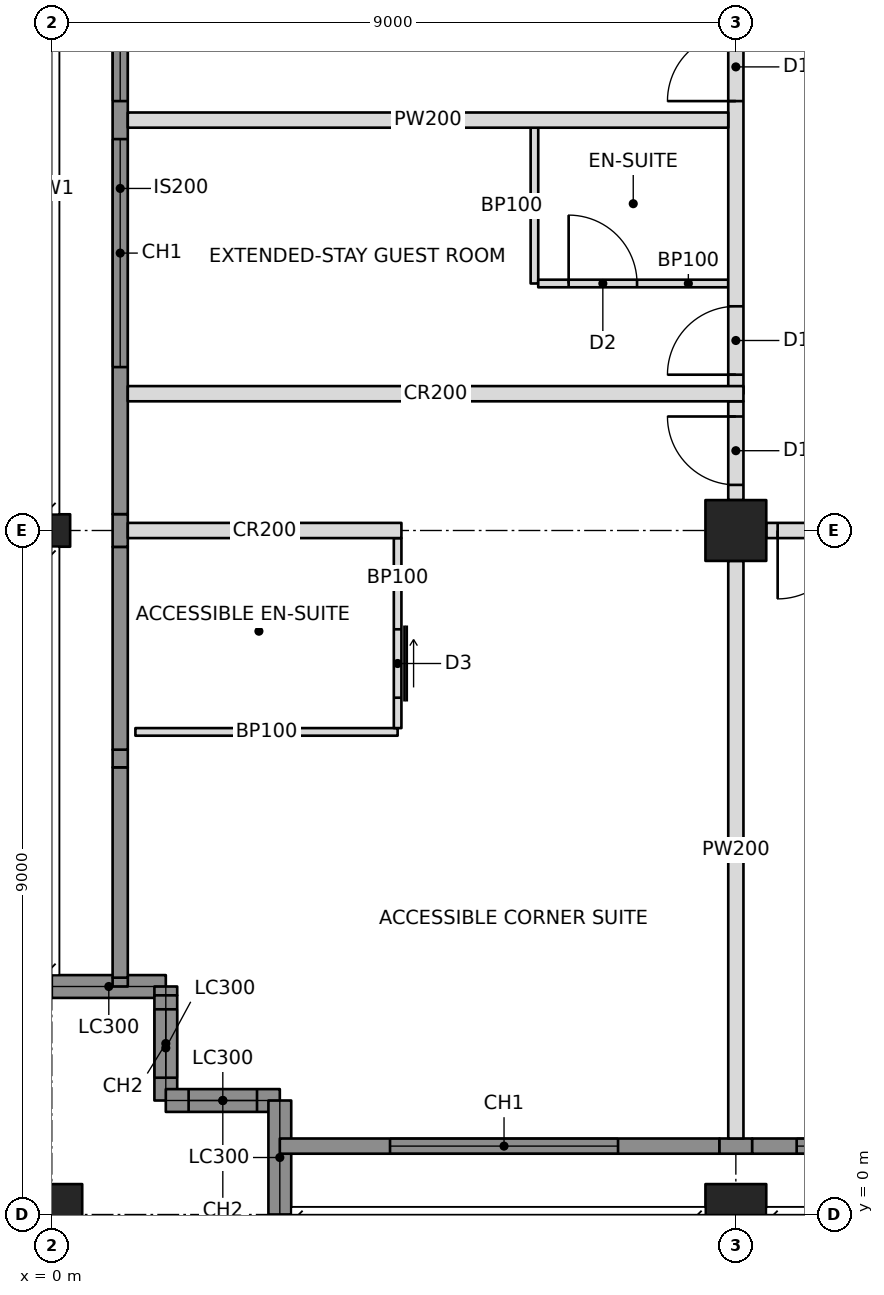
"""IFC4 building model, lengths in metres.
Left out: names, types, materials, properties, quantities, classifications, styles, units other than length and angle.
Written with IfcOpenShell. Run it as: python <this file> out.ifc"""

import sys

from ifc_helpers import new_model, si_unit, direction, frame, frame_2d, origin, origin_with_axes, origin_2d, place, context, subcontext, project, spatial, rectangle, hollow_rectangle, i_section, extrude, element, fill, save


model = new_model("IFC4")
c1 = context("Model", 3, precision=1e-05, world=origin(), true_north=direction((0.0, 1.0)))
c2 = subcontext(c1, "Body", "Model", "MODEL_VIEW")
j1 = project(units=[si_unit("LENGTHUNIT", "METRE"), si_unit("PLANEANGLEUNIT", "RADIAN")], contexts=[c1])
p1 = place(None, origin())
s1 = spatial("IfcSite", under=j1, at=p1, CompositionType="ELEMENT")
p2 = place(p1, origin())
s2 = spatial("IfcBuilding", under=s1, at=p2, CompositionType="ELEMENT")
p3 = place(p2, frame((0.0, 0.0, 218.2)))
s3 = spatial("IfcBuildingStorey", under=s2, at=p3, CompositionType="ELEMENT", Elevation=218.2)
p4 = place(p3, origin_with_axes())
e1 = element("IfcColumn", 1, at=p4, inside=s3, PredefinedType="COLUMN", context=c2, shape_type="SweptSolid", body=[
    extrude(hollow_rectangle(XDim=0.8, YDim=0.8, WallThickness=0.06, at=origin_2d()), origin(), (0.0, 0.0, 1.0), 3.4),
])
p5 = place(p3, frame((0.0, 9.0, 0.0), z_axis=(0.0, 0.0, 1.0), x_axis=(0.0, 1.0, 0.0)))
e2 = element("IfcColumn", 2, at=p5, inside=s3, PredefinedType="COLUMN", context=c2, shape_type="SweptSolid", body=[
    extrude(i_section(OverallWidth=0.427, OverallDepth=0.483, WebThickness=0.051, FlangeThickness=0.082, at=origin_2d()), origin(), (0.0, 0.0, 1.0), 3.4),
])
p6 = place(p3, frame((9.0, 0.0, 0.0), z_axis=(0.0, 0.0, 1.0), x_axis=(1.0, 0.0, 0.0)))
e3 = element("IfcColumn", 3, at=p6, inside=s3, PredefinedType="COLUMN", context=c2, shape_type="SweptSolid", body=[
    extrude(hollow_rectangle(XDim=0.8, YDim=0.8, WallThickness=0.06, at=origin_2d()), origin(), (0.0, 0.0, 1.0), 3.4),
])
p7 = place(p3, frame((9.0, 9.0, 0.0), z_axis=(0.0, 0.0, 1.0), x_axis=(1.0, 0.0, 0.0)))
e4 = element("IfcColumn", 4, at=p7, inside=s3, PredefinedType="COLUMN", context=c2, shape_type="SweptSolid", body=[
    extrude(hollow_rectangle(XDim=0.8, YDim=0.8, WallThickness=0.1, at=origin_2d()), origin(), (0.0, 0.0, 1.0), 3.4),
])
p8 = place(p3, frame((0.0, 3.0, 0.0), z_axis=(0.0, 0.0, 1.0), x_axis=(1.0, 0.0, 0.0)))
e5 = element("IfcWall", 5, at=p8, inside=s3, PredefinedType="SOLIDWALL", context=c2, shape_type="SweptSolid", body=[
    extrude(rectangle(XDim=1.5, YDim=0.3, at=frame_2d((0.75, 0.0))), origin(), (0.0, 0.0, 1.0), 2.202),
])
p9 = place(p3, frame((1.5, 3.0, 0.0), z_axis=(0.0, 0.0, 1.0), x_axis=(0.0, -1.0, 0.0)))
e6 = element("IfcWall", 6, at=p9, inside=s3, PredefinedType="SOLIDWALL", context=c2, shape_type="SweptSolid", body=[
    extrude(rectangle(XDim=0.116, YDim=0.3, at=frame_2d((0.058, 0.0))), origin(), (0.0, 0.0, 1.0), 2.542),
])
p10 = place(p3, frame((1.5, 1.5, 0.0), z_axis=(0.0, 0.0, 1.0), x_axis=(1.0, 0.0, 0.0)))
e7 = element("IfcWall", 7, at=p10, inside=s3, PredefinedType="SOLIDWALL", context=c2, shape_type="SweptSolid", body=[
    extrude(rectangle(XDim=1.5, YDim=0.3, at=frame_2d((0.75, 0.0))), origin(), (0.0, 0.0, 1.0), 3.15),
])
p11 = place(p10, frame((0.3, 0.0, 0.6)))
e8 = element("IfcOpeningElement", 8, at=p11, cuts=e7, PredefinedType="OPENING", context=c2, shape_type="SweptSolid", body=[
    extrude(rectangle(XDim=0.9, YDim=2.2, at=frame_2d((0.45, 1.1))), frame((0.0, 0.16, 0.0), z_axis=(0.0, -1.0, 0.0), x_axis=(1.0, 0.0, 0.0)), (0.0, 0.0, 1.0), 0.32),
])
p12 = place(p3, frame((3.0, 1.5, 0.0), z_axis=(0.0, 0.0, 1.0), x_axis=(0.0, -1.0, 0.0)))
e9 = element("IfcWall", 9, at=p12, inside=s3, PredefinedType="SOLIDWALL", context=c2, shape_type="SweptSolid", body=[
    extrude(rectangle(XDim=1.5, YDim=0.3, at=frame_2d((0.75, 0.0))), origin(), (0.0, 0.0, 1.0), 2.202),
])
p13 = place(p3, frame((3.0, 0.9, 0.0), z_axis=(0.0, 0.0, 1.0), x_axis=(1.0, 0.0, 0.0)))
e10 = element("IfcWall", 10, at=p13, inside=s3, PredefinedType="SOLIDWALL", context=c2, shape_type="SweptSolid", body=[
    extrude(rectangle(XDim=5.785, YDim=0.2, at=frame_2d((2.892, 0.0))), origin(), (0.0, 0.0, 1.0), 3.15),
])
p14 = place(p13, frame((1.45, 0.0, 0.6)))
e11 = element("IfcOpeningElement", 11, at=p14, cuts=e10, PredefinedType="OPENING", context=c2, shape_type="SweptSolid", body=[
    extrude(rectangle(XDim=3.0, YDim=2.2, at=frame_2d((1.5, 1.1))), frame((0.0, 0.11, 0.0), z_axis=(0.0, -1.0, 0.0), x_axis=(1.0, 0.0, 0.0)), (0.0, 0.0, 1.0), 0.22),
])
p15 = place(p3, frame((0.9, 3.0, 0.0), z_axis=(0.0, 0.0, 1.0), x_axis=(0.0, 1.0, 0.0)))
e12 = element("IfcWall", 12, at=p15, inside=s3, PredefinedType="SOLIDWALL", context=c2, shape_type="SweptSolid", body=[
    extrude(rectangle(XDim=0.116, YDim=0.2, at=frame_2d((0.058, 0.0))), origin(), (0.0, 0.0, 1.0), 2.542),
])
p16 = place(p3, frame((1.0, 9.0, 0.0), z_axis=(0.0, 0.0, 1.0), x_axis=(1.0, 0.0, 0.0)))
e13 = element("IfcWall", 13, at=p16, inside=s3, PredefinedType="PARTITIONING", context=c2, shape_type="SweptSolid", body=[
    extrude(rectangle(XDim=3.6, YDim=0.2, at=frame_2d((1.8, 0.0))), origin(), (0.0, 0.0, 1.0), 2.21),
])
p17 = place(p3, frame((9.4, 9.0, 0.0), z_axis=(0.0, 0.0, 1.0), x_axis=(1.0, 0.0, 0.0)))
e14 = element("IfcWall", 14, at=p17, inside=s3, PredefinedType="PARTITIONING", context=c2, shape_type="SweptSolid", body=[
    extrude(rectangle(XDim=8.2, YDim=0.2, at=frame_2d((4.1, 0.0))), origin(), (0.0, 0.0, 1.0), 2.21),
])
p18 = place(p17, frame((0.15, 0.0, 0.0)))
e15 = element("IfcOpeningElement", 15, at=p18, cuts=e14, PredefinedType="OPENING", context=c2, shape_type="SweptSolid", body=[
    extrude(rectangle(XDim=0.9, YDim=2.1, at=frame_2d((0.45, 1.05))), frame((0.0, 0.11, 0.0), z_axis=(0.0, -1.0, 0.0), x_axis=(1.0, 0.0, 0.0)), (0.0, 0.0, 1.0), 0.22),
])
p19 = place(p3, frame((9.0, 10.8, 0.0), z_axis=(0.0, 0.0, 1.0), x_axis=(0.0, 1.0, 0.0)))
e16 = element("IfcWall", 16, at=p19, inside=s3, PredefinedType="PARTITIONING", context=c2, shape_type="SweptSolid", body=[
    extrude(rectangle(XDim=6.8, YDim=0.2, at=frame_2d((3.4, 0.0))), origin(), (0.0, 0.0, 1.0), 2.21),
])
p20 = place(p19, frame((0.25, 0.0, 0.0)))
e17 = element("IfcOpeningElement", 17, at=p20, cuts=e16, PredefinedType="OPENING", context=c2, shape_type="SweptSolid", body=[
    extrude(rectangle(XDim=0.9, YDim=2.1, at=frame_2d((0.45, 1.05))), frame((0.0, 0.11, 0.0), z_axis=(0.0, -1.0, 0.0), x_axis=(1.0, 0.0, 0.0)), (0.0, 0.0, 1.0), 0.22),
])
p21 = place(p19, frame((3.85, 0.0, 0.0)))
e18 = element("IfcOpeningElement", 18, at=p21, cuts=e16, PredefinedType="OPENING", context=c2, shape_type="SweptSolid", body=[
    extrude(rectangle(XDim=0.9, YDim=2.1, at=frame_2d((0.45, 1.05))), frame((0.0, 0.11, 0.0), z_axis=(0.0, -1.0, 0.0), x_axis=(1.0, 0.0, 0.0)), (0.0, 0.0, 1.0), 0.22),
])
p22 = place(p3, frame((1.0, 10.8, 0.0), z_axis=(0.0, 0.0, 1.0), x_axis=(1.0, 0.0, 0.0)))
e19 = element("IfcWall", 19, at=p22, inside=s3, PredefinedType="PARTITIONING", context=c2, shape_type="SweptSolid", body=[
    extrude(rectangle(XDim=8.1, YDim=0.2, at=frame_2d((4.05, 0.0))), origin(), (0.0, 0.0, 1.0), 2.21),
])
p23 = place(p3, frame((9.0, 8.6, 0.0), z_axis=(0.0, 0.0, 1.0), x_axis=(0.0, -1.0, 0.0)))
e20 = element("IfcWall", 20, at=p23, inside=s3, PredefinedType="PARTITIONING", context=c2, shape_type="SweptSolid", body=[
    extrude(rectangle(XDim=7.6, YDim=0.2, at=frame_2d((3.8, 0.0))), origin(), (0.0, 0.0, 1.0), 2.21),
])
p24 = place(p3, frame((1.1, 6.35, 0.0), z_axis=(0.0, 0.0, 1.0), x_axis=(1.0, 0.0, 0.0)))
e21 = element("IfcWall", 21, at=p24, inside=s3, PredefinedType="PARTITIONING", context=c2, shape_type="SweptSolid", body=[
    extrude(rectangle(XDim=3.45, YDim=0.1, at=frame_2d((1.725, 0.0))), origin(), (0.0, 0.0, 1.0), 3.15),
])
p25 = place(p3, frame((4.55, 8.9, 0.0), z_axis=(0.0, 0.0, 1.0), x_axis=(0.0, -1.0, 0.0)))
e22 = element("IfcWall", 22, at=p25, inside=s3, PredefinedType="PARTITIONING", context=c2, shape_type="SweptSolid", body=[
    extrude(rectangle(XDim=2.5, YDim=0.1, at=frame_2d((1.25, 0.0))), origin(), (0.0, 0.0, 1.0), 2.21),
])
p26 = place(p25, frame((1.2, 0.0, 0.0)))
e23 = element("IfcOpeningElement", 23, at=p26, cuts=e22, PredefinedType="OPENING", context=c2, shape_type="SweptSolid", body=[
    extrude(rectangle(XDim=0.9, YDim=2.1, at=frame_2d((0.45, 1.05))), frame((0.0, 0.06, 0.0), z_axis=(0.0, -1.0, 0.0), x_axis=(1.0, 0.0, 0.0)), (0.0, 0.0, 1.0), 0.12),
])
p27 = place(p3, frame((8.9, 14.4, 0.0), z_axis=(0.0, 0.0, 1.0), x_axis=(-1.0, 0.0, 0.0)))
e24 = element("IfcWall", 24, at=p27, inside=s3, PredefinedType="PARTITIONING", context=c2, shape_type="SweptSolid", body=[
    extrude(rectangle(XDim=7.9, YDim=0.2, at=frame_2d((3.95, 0.0))), origin(), (0.0, 0.0, 1.0), 2.21),
])
p28 = place(p3, frame((6.35, 12.25, 0.0), z_axis=(0.0, 0.0, 1.0), x_axis=(0.0, 1.0, 0.0)))
e25 = element("IfcWall", 25, at=p28, inside=s3, PredefinedType="PARTITIONING", context=c2, shape_type="SweptSolid", body=[
    extrude(rectangle(XDim=2.05, YDim=0.1, at=frame_2d((1.025, 0.0))), origin(), (0.0, 0.0, 1.0), 3.15),
])
p29 = place(p3, frame((8.9, 12.25, 0.0), z_axis=(0.0, 0.0, 1.0), x_axis=(-1.0, 0.0, 0.0)))
e26 = element("IfcWall", 26, at=p29, inside=s3, PredefinedType="PARTITIONING", context=c2, shape_type="SweptSolid", body=[
    extrude(rectangle(XDim=2.5, YDim=0.1, at=frame_2d((1.25, 0.0))), origin(), (0.0, 0.0, 1.0), 2.21),
])
p30 = place(p29, frame((1.2, 0.0, 0.0)))
e27 = element("IfcOpeningElement", 27, at=p30, cuts=e26, PredefinedType="OPENING", context=c2, shape_type="SweptSolid", body=[
    extrude(rectangle(XDim=0.9, YDim=2.1, at=frame_2d((0.45, 1.05))), frame((0.0, 0.06, 0.0), z_axis=(0.0, -1.0, 0.0), x_axis=(1.0, 0.0, 0.0)), (0.0, 0.0, 1.0), 0.12),
])
p31 = place(p3, frame((9.0, 9.4, 0.0), z_axis=(0.0, 0.0, 1.0), x_axis=(0.0, 1.0, 0.0)))
e28 = element("IfcWall", 28, at=p31, inside=s3, PredefinedType="PARTITIONING", context=c2, shape_type="SweptSolid", body=[
    extrude(rectangle(XDim=1.3, YDim=0.2, at=frame_2d((0.65, 0.0))), origin(), (0.0, 0.0, 1.0), 2.21),
])
p32 = place(p31, frame((0.2, 0.0, 0.0)))
e29 = element("IfcOpeningElement", 29, at=p32, cuts=e28, PredefinedType="OPENING", context=c2, shape_type="SweptSolid", body=[
    extrude(rectangle(XDim=0.9, YDim=2.1, at=frame_2d((0.45, 1.05))), frame((0.0, 0.11, 0.0), z_axis=(0.0, -1.0, 0.0), x_axis=(1.0, 0.0, 0.0)), (0.0, 0.0, 1.0), 0.22),
])
p33 = place(p3, frame((1.5, 2.884, 0.0), z_axis=(0.0, 0.0, 1.0), x_axis=(0.0, -1.0, 0.0)))
e30 = element("IfcWall", 30, at=p33, inside=s3, PredefinedType="SOLIDWALL", context=c2, shape_type="SweptSolid", body=[
    extrude(rectangle(XDim=1.384, YDim=0.3, at=frame_2d((0.692, 0.0))), origin(), (0.0, 0.0, 1.0), 3.15),
])
p34 = place(p33, frame((0.184, 0.0, 0.6)))
e31 = element("IfcOpeningElement", 31, at=p34, cuts=e30, PredefinedType="OPENING", context=c2, shape_type="SweptSolid", body=[
    extrude(rectangle(XDim=0.9, YDim=2.2, at=frame_2d((0.45, 1.1))), frame((0.0, 0.16, 0.0), z_axis=(0.0, -1.0, 0.0), x_axis=(1.0, 0.0, 0.0)), (0.0, 0.0, 1.0), 0.32),
])
p35 = place(p3, frame((8.785, 0.9, 0.0), z_axis=(0.0, 0.0, 1.0), x_axis=(1.0, 0.0, 0.0)))
e32 = element("IfcWall", 32, at=p35, inside=s3, PredefinedType="SOLIDWALL", context=c2, shape_type="SweptSolid", body=[
    extrude(rectangle(XDim=0.431, YDim=0.2, at=frame_2d((0.215, 0.0))), origin(), (0.0, 0.0, 1.0), 2.21),
])
p36 = place(p3, frame((9.215, 0.9, 0.0), z_axis=(0.0, 0.0, 1.0), x_axis=(1.0, 0.0, 0.0)))
e33 = element("IfcWall", 33, at=p36, inside=s3, PredefinedType="SOLIDWALL", context=c2, shape_type="SweptSolid", body=[
    extrude(rectangle(XDim=8.571, YDim=0.2, at=frame_2d((4.285, 0.0))), origin(), (0.0, 0.0, 1.0), 3.15),
])
p37 = place(p36, frame((0.585, 0.0, 0.6)))
e34 = element("IfcOpeningElement", 34, at=p37, cuts=e33, PredefinedType="OPENING", context=c2, shape_type="SweptSolid", body=[
    extrude(rectangle(XDim=3.0, YDim=2.2, at=frame_2d((1.5, 1.1))), frame((0.0, 0.11, 0.0), z_axis=(0.0, -1.0, 0.0), x_axis=(1.0, 0.0, 0.0)), (0.0, 0.0, 1.0), 0.22),
])
p38 = place(p36, frame((4.985, 0.0, 0.6)))
e35 = element("IfcOpeningElement", 35, at=p38, cuts=e33, PredefinedType="OPENING", context=c2, shape_type="SweptSolid", body=[
    extrude(rectangle(XDim=3.0, YDim=2.2, at=frame_2d((1.5, 1.1))), frame((0.0, 0.11, 0.0), z_axis=(0.0, -1.0, 0.0), x_axis=(1.0, 0.0, 0.0)), (0.0, 0.0, 1.0), 0.22),
])
p39 = place(p3, frame((0.9, 3.116, 0.0), z_axis=(0.0, 0.0, 1.0), x_axis=(0.0, 1.0, 0.0)))
e36 = element("IfcWall", 36, at=p39, inside=s3, PredefinedType="SOLIDWALL", context=c2, shape_type="SweptSolid", body=[
    extrude(rectangle(XDim=2.768, YDim=0.2, at=frame_2d((1.384, 0.0))), origin(), (0.0, 0.0, 1.0), 3.15),
])
p40 = place(p3, frame((0.9, 5.884, 0.0), z_axis=(0.0, 0.0, 1.0), x_axis=(0.0, 1.0, 0.0)))
e37 = element("IfcWall", 37, at=p40, inside=s3, PredefinedType="SOLIDWALL", context=c2, shape_type="SweptSolid", body=[
    extrude(rectangle(XDim=0.232, YDim=0.2, at=frame_2d((0.116, 0.0))), origin(), (0.0, 0.0, 1.0), 2.542),
])
p41 = place(p3, frame((0.9, 6.116, 0.0), z_axis=(0.0, 0.0, 1.0), x_axis=(0.0, 1.0, 0.0)))
e38 = element("IfcWall", 38, at=p41, inside=s3, PredefinedType="SOLIDWALL", context=c2, shape_type="SweptSolid", body=[
    extrude(rectangle(XDim=2.668, YDim=0.2, at=frame_2d((1.334, 0.0))), origin(), (0.0, 0.0, 1.0), 3.15),
])
p42 = place(p3, frame((0.9, 8.785, 0.0), z_axis=(0.0, 0.0, 1.0), x_axis=(0.0, 1.0, 0.0)))
e39 = element("IfcWall", 39, at=p42, inside=s3, PredefinedType="SOLIDWALL", context=c2, shape_type="SweptSolid", body=[
    extrude(rectangle(XDim=0.431, YDim=0.2, at=frame_2d((0.215, 0.0))), origin(), (0.0, 0.0, 1.0), 2.21),
])
p43 = place(p3, frame((0.9, 9.215, 0.0), z_axis=(0.0, 0.0, 1.0), x_axis=(0.0, 1.0, 0.0)))
e40 = element("IfcWall", 40, at=p43, inside=s3, PredefinedType="SOLIDWALL", context=c2, shape_type="SweptSolid", body=[
    extrude(rectangle(XDim=8.571, YDim=0.2, at=frame_2d((4.285, 0.0))), origin(), (0.0, 0.0, 1.0), 3.15),
])
p44 = place(p43, frame((1.935, 0.0, 0.6)))
e41 = element("IfcOpeningElement", 41, at=p44, cuts=e40, PredefinedType="OPENING", context=c2, shape_type="SweptSolid", body=[
    extrude(rectangle(XDim=3.0, YDim=2.2, at=frame_2d((1.5, 1.1))), frame((0.0, 0.11, 0.0), z_axis=(0.0, -1.0, 0.0), x_axis=(1.0, 0.0, 0.0)), (0.0, 0.0, 1.0), 0.22),
])
p45 = place(p43, frame((5.435, 0.0, 0.6)))
e42 = element("IfcOpeningElement", 42, at=p45, cuts=e40, PredefinedType="OPENING", context=c2, shape_type="SweptSolid", body=[
    extrude(rectangle(XDim=3.0, YDim=2.2, at=frame_2d((1.5, 1.1))), frame((0.0, 0.11, 0.0), z_axis=(0.0, -1.0, 0.0), x_axis=(1.0, 0.0, 0.0)), (0.0, 0.0, 1.0), 0.22),
])
p46 = place(p34, origin())
e43 = element("IfcWindow", 43, at=p46, inside=s3, PartitioningType="SINGLE_PANEL", PredefinedType="WINDOW", context=c2, shape_type="SweptSolid", body=[
    extrude(rectangle(XDim=0.9, YDim=2.2, at=frame_2d((0.45, 1.1))), frame((0.0, 0.03, 0.0), z_axis=(0.0, -1.0, 0.0), x_axis=(1.0, 0.0, 0.0)), (0.0, 0.0, 1.0), 0.06),
])
fill(e31, e43)
p47 = place(p11, origin())
e44 = element("IfcWindow", 44, at=p47, inside=s3, PartitioningType="SINGLE_PANEL", PredefinedType="WINDOW", context=c2, shape_type="SweptSolid", body=[
    extrude(rectangle(XDim=0.9, YDim=2.2, at=frame_2d((0.45, 1.1))), frame((0.0, 0.03, 0.0), z_axis=(0.0, -1.0, 0.0), x_axis=(1.0, 0.0, 0.0)), (0.0, 0.0, 1.0), 0.06),
])
fill(e8, e44)
p48 = place(p14, origin())
e45 = element("IfcWindow", 45, at=p48, inside=s3, PartitioningType="TRIPLE_PANEL_VERTICAL", PredefinedType="WINDOW", context=c2, shape_type="SweptSolid", body=[
    extrude(rectangle(XDim=3.0, YDim=2.2, at=frame_2d((1.5, 1.1))), frame((0.0, 0.03, 0.0), z_axis=(0.0, -1.0, 0.0), x_axis=(1.0, 0.0, 0.0)), (0.0, 0.0, 1.0), 0.06),
])
fill(e11, e45)
p49 = place(p37, origin())
e46 = element("IfcWindow", 46, at=p49, inside=s3, PartitioningType="TRIPLE_PANEL_VERTICAL", PredefinedType="WINDOW", context=c2, shape_type="SweptSolid", body=[
    extrude(rectangle(XDim=3.0, YDim=2.2, at=frame_2d((1.5, 1.1))), frame((0.0, 0.03, 0.0), z_axis=(0.0, -1.0, 0.0), x_axis=(1.0, 0.0, 0.0)), (0.0, 0.0, 1.0), 0.06),
])
fill(e34, e46)
p50 = place(p44, origin())
e47 = element("IfcWindow", 47, at=p50, inside=s3, PartitioningType="TRIPLE_PANEL_VERTICAL", PredefinedType="WINDOW", context=c2, shape_type="SweptSolid", body=[
    extrude(rectangle(XDim=3.0, YDim=2.2, at=frame_2d((1.5, 1.1))), frame((0.0, 0.03, 0.0), z_axis=(0.0, -1.0, 0.0), x_axis=(1.0, 0.0, 0.0)), (0.0, 0.0, 1.0), 0.06),
])
fill(e41, e47)
p51 = place(p45, origin())
e48 = element("IfcWindow", 48, at=p51, inside=s3, PartitioningType="TRIPLE_PANEL_VERTICAL", PredefinedType="WINDOW", context=c2, shape_type="SweptSolid", body=[
    extrude(rectangle(XDim=3.0, YDim=2.2, at=frame_2d((1.5, 1.1))), frame((0.0, 0.03, 0.0), z_axis=(0.0, -1.0, 0.0), x_axis=(1.0, 0.0, 0.0)), (0.0, 0.0, 1.0), 0.06),
])
fill(e42, e48)
p52 = place(p26, origin())
e49 = element("IfcDoor", 49, at=p52, inside=s3, OperationType="SLIDING_TO_LEFT", PredefinedType="DOOR", context=c2, shape_type="SweptSolid", body=[
    extrude(rectangle(XDim=0.9, YDim=2.1, at=frame_2d((0.45, 1.05))), frame((0.0, 0.025, 0.0), z_axis=(0.0, -1.0, 0.0), x_axis=(1.0, 0.0, 0.0)), (0.0, 0.0, 1.0), 0.05),
])
fill(e23, e49)
p53 = place(p18, frame((0.9, 0.0, 0.0), z_axis=(0.0, 0.0, 1.0), x_axis=(-1.0, 0.0, 0.0)))
e50 = element("IfcDoor", 50, at=p53, inside=s3, OperationType="SINGLE_SWING_RIGHT", PredefinedType="DOOR", context=c2, shape_type="SweptSolid", body=[
    extrude(rectangle(XDim=0.9, YDim=2.1, at=frame_2d((0.45, 1.05))), frame((0.0, 0.025, 0.0), z_axis=(0.0, -1.0, 0.0), x_axis=(1.0, 0.0, 0.0)), (0.0, 0.0, 1.0), 0.05),
])
fill(e15, e50)
p54 = place(p30, frame((0.9, 0.0, 0.0), z_axis=(0.0, 0.0, 1.0), x_axis=(-1.0, 0.0, 0.0)))
e51 = element("IfcDoor", 51, at=p54, inside=s3, OperationType="SINGLE_SWING_LEFT", PredefinedType="DOOR", context=c2, shape_type="SweptSolid", body=[
    extrude(rectangle(XDim=0.9, YDim=2.1, at=frame_2d((0.45, 1.05))), frame((0.0, 0.025, 0.0), z_axis=(0.0, -1.0, 0.0), x_axis=(1.0, 0.0, 0.0)), (0.0, 0.0, 1.0), 0.05),
])
fill(e27, e51)
p55 = place(p20, origin())
e52 = element("IfcDoor", 52, at=p55, inside=s3, OperationType="SINGLE_SWING_LEFT", PredefinedType="DOOR", context=c2, shape_type="SweptSolid", body=[
    extrude(rectangle(XDim=0.9, YDim=2.1, at=frame_2d((0.45, 1.05))), frame((0.0, 0.025, 0.0), z_axis=(0.0, -1.0, 0.0), x_axis=(1.0, 0.0, 0.0)), (0.0, 0.0, 1.0), 0.05),
])
fill(e17, e52)
p56 = place(p21, origin())
e53 = element("IfcDoor", 53, at=p56, inside=s3, OperationType="SINGLE_SWING_LEFT", PredefinedType="DOOR", context=c2, shape_type="SweptSolid", body=[
    extrude(rectangle(XDim=0.9, YDim=2.1, at=frame_2d((0.45, 1.05))), frame((0.0, 0.025, 0.0), z_axis=(0.0, -1.0, 0.0), x_axis=(1.0, 0.0, 0.0)), (0.0, 0.0, 1.0), 0.05),
])
fill(e18, e53)
p57 = place(p32, origin())
e54 = element("IfcDoor", 54, at=p57, inside=s3, OperationType="SINGLE_SWING_RIGHT", PredefinedType="DOOR", context=c2, shape_type="SweptSolid", body=[
    extrude(rectangle(XDim=0.9, YDim=2.1, at=frame_2d((0.45, 1.05))), frame((0.0, 0.025, 0.0), z_axis=(0.0, -1.0, 0.0), x_axis=(1.0, 0.0, 0.0)), (0.0, 0.0, 1.0), 0.05),
])
fill(e29, e54)
save(model, sys.argv[1])
